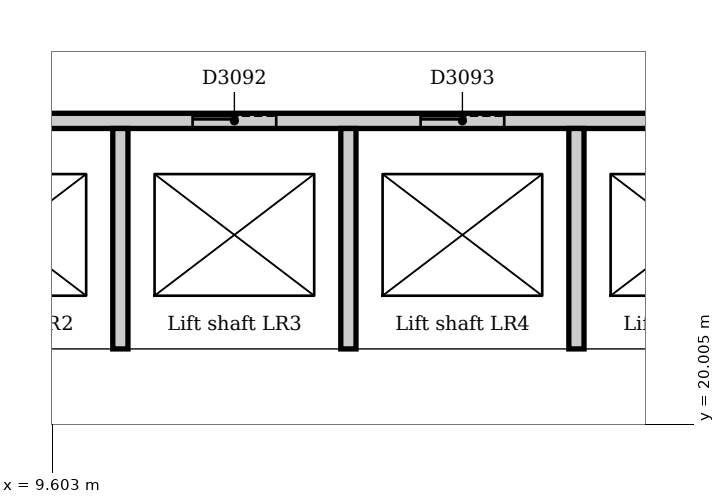
"""IFC4 building model, lengths in metres.
Left out: names, types, materials, properties, quantities, classifications, styles, units other than length and angle.
Written with IfcOpenShell. Run it as: python <this file> out.ifc"""

import sys

from ifc_helpers import new_model, si_unit, direction, frame, frame_2d, origin, place, context, subcontext, project, spatial, rectangle, extrude, element, fill, save


model = new_model("IFC4")
c1 = context("Model", 3, precision=1e-05, world=origin(), true_north=direction((0.0, 1.0)))
c2 = subcontext(c1, "Body", "Model", "MODEL_VIEW")
j1 = project(units=[si_unit("LENGTHUNIT", "METRE"), si_unit("PLANEANGLEUNIT", "RADIAN")], contexts=[c1])
p1 = place(None, origin())
s1 = spatial("IfcSite", under=j1, at=p1, CompositionType="ELEMENT")
p2 = place(p1, origin())
s2 = spatial("IfcBuilding", under=s1, at=p2, CompositionType="ELEMENT")
p3 = place(p2, frame((0.0, 0.0, 6.0)))
s3 = spatial("IfcBuildingStorey", under=s2, at=p3, CompositionType="ELEMENT", Elevation=6.0)
p4 = place(p3, frame((3.9, 20.4, 0.0), z_axis=(0.0, 0.0, 1.0), x_axis=(1.0, 0.0, 0.0)))
e1 = element("IfcWall", 1, at=p4, inside=s3, PredefinedType="SOLIDWALL", context=c2, shape_type="SweptSolid", body=[
    extrude(rectangle(XDim=19.8, YDim=1.2, at=frame_2d((9.9, 0.0))), origin(), (0.0, 0.0, 1.0), 5.0),
])
p5 = place(p3, frame((4.5, 24.0, 0.0), z_axis=(0.0, 0.0, 1.0), x_axis=(1.0, 0.0, 0.0)))
e2 = element("IfcWall", 2, at=p5, inside=s3, PredefinedType="PARTITIONING", context=c2, shape_type="SweptSolid", body=[
    extrude(rectangle(XDim=18.0, YDim=0.2, at=frame_2d((9.0, 0.0))), origin(), (0.0, 0.0, 1.0), 4.7),
])
p6 = place(p5, frame((0.95, 0.0, 0.0)))
e3 = element("IfcOpeningElement", 3, at=p6, cuts=e2, PredefinedType="OPENING", context=c2, shape_type="SweptSolid", body=[
    extrude(rectangle(XDim=1.1, YDim=2.1, at=frame_2d((0.55, 1.05))), frame((0.0, 0.11, 0.0), z_axis=(0.0, -1.0, 0.0), x_axis=(1.0, 0.0, 0.0)), (0.0, 0.0, 1.0), 0.22),
])
p7 = place(p5, frame((3.95, 0.0, 0.0)))
e4 = element("IfcOpeningElement", 4, at=p7, cuts=e2, PredefinedType="OPENING", context=c2, shape_type="SweptSolid", body=[
    extrude(rectangle(XDim=1.1, YDim=2.1, at=frame_2d((0.55, 1.05))), frame((0.0, 0.11, 0.0), z_axis=(0.0, -1.0, 0.0), x_axis=(1.0, 0.0, 0.0)), (0.0, 0.0, 1.0), 0.22),
])
p8 = place(p5, frame((6.95, 0.0, 0.0)))
e5 = element("IfcOpeningElement", 5, at=p8, cuts=e2, PredefinedType="OPENING", context=c2, shape_type="SweptSolid", body=[
    extrude(rectangle(XDim=1.1, YDim=2.1, at=frame_2d((0.55, 1.05))), frame((0.0, 0.11, 0.0), z_axis=(0.0, -1.0, 0.0), x_axis=(1.0, 0.0, 0.0)), (0.0, 0.0, 1.0), 0.22),
])
p9 = place(p5, frame((9.95, 0.0, 0.0)))
e6 = element("IfcOpeningElement", 6, at=p9, cuts=e2, PredefinedType="OPENING", context=c2, shape_type="SweptSolid", body=[
    extrude(rectangle(XDim=1.1, YDim=2.1, at=frame_2d((0.55, 1.05))), frame((0.0, 0.11, 0.0), z_axis=(0.0, -1.0, 0.0), x_axis=(1.0, 0.0, 0.0)), (0.0, 0.0, 1.0), 0.22),
])
p10 = place(p5, frame((12.95, 0.0, 0.0)))
e7 = element("IfcOpeningElement", 7, at=p10, cuts=e2, PredefinedType="OPENING", context=c2, shape_type="SweptSolid", body=[
    extrude(rectangle(XDim=1.1, YDim=2.1, at=frame_2d((0.55, 1.05))), frame((0.0, 0.11, 0.0), z_axis=(0.0, -1.0, 0.0), x_axis=(1.0, 0.0, 0.0)), (0.0, 0.0, 1.0), 0.22),
])
p11 = place(p5, frame((15.95, 0.0, 0.0)))
e8 = element("IfcOpeningElement", 8, at=p11, cuts=e2, PredefinedType="OPENING", context=c2, shape_type="SweptSolid", body=[
    extrude(rectangle(XDim=1.1, YDim=2.1, at=frame_2d((0.55, 1.05))), frame((0.0, 0.11, 0.0), z_axis=(0.0, -1.0, 0.0), x_axis=(1.0, 0.0, 0.0)), (0.0, 0.0, 1.0), 0.22),
])
for number, where, z_axis, x_axis in (
    (9, (10.5, 21.0, 0.0), (0.0, 0.0, 1.0), (0.0, 1.0, 0.0)),
    (10, (13.5, 21.0, 0.0), (0.0, 0.0, 1.0), (0.0, 1.0, 0.0)),
    (11, (16.5, 21.0, 0.0), (0.0, 0.0, 1.0), (0.0, 1.0, 0.0)),
):
    element("IfcWall", number, at=place(p3, frame(where, z_axis=z_axis, x_axis=x_axis)), inside=s3, PredefinedType="PARTITIONING", context=c2, shape_type="SweptSolid", body=[
        extrude(rectangle(XDim=2.9, YDim=0.2, at=frame_2d((1.45, 0.0))), origin(), (0.0, 0.0, 1.0), 4.7),
    ])
p12 = place(p8, origin())
e12 = element("IfcDoor", 12, at=p12, inside=s3, OperationType="SLIDING_TO_LEFT", PredefinedType="DOOR", context=c2, shape_type="SweptSolid", body=[
    extrude(rectangle(XDim=1.1, YDim=2.1, at=frame_2d((0.55, 1.05))), frame((0.0, 0.025, 0.0), z_axis=(0.0, -1.0, 0.0), x_axis=(1.0, 0.0, 0.0)), (0.0, 0.0, 1.0), 0.05),
])
fill(e5, e12)
p13 = place(p9, origin())
e13 = element("IfcDoor", 13, at=p13, inside=s3, OperationType="SLIDING_TO_LEFT", PredefinedType="DOOR", context=c2, shape_type="SweptSolid", body=[
    extrude(rectangle(XDim=1.1, YDim=2.1, at=frame_2d((0.55, 1.05))), frame((0.0, 0.025, 0.0), z_axis=(0.0, -1.0, 0.0), x_axis=(1.0, 0.0, 0.0)), (0.0, 0.0, 1.0), 0.05),
])
fill(e6, e13)
save(model, sys.argv[1])
